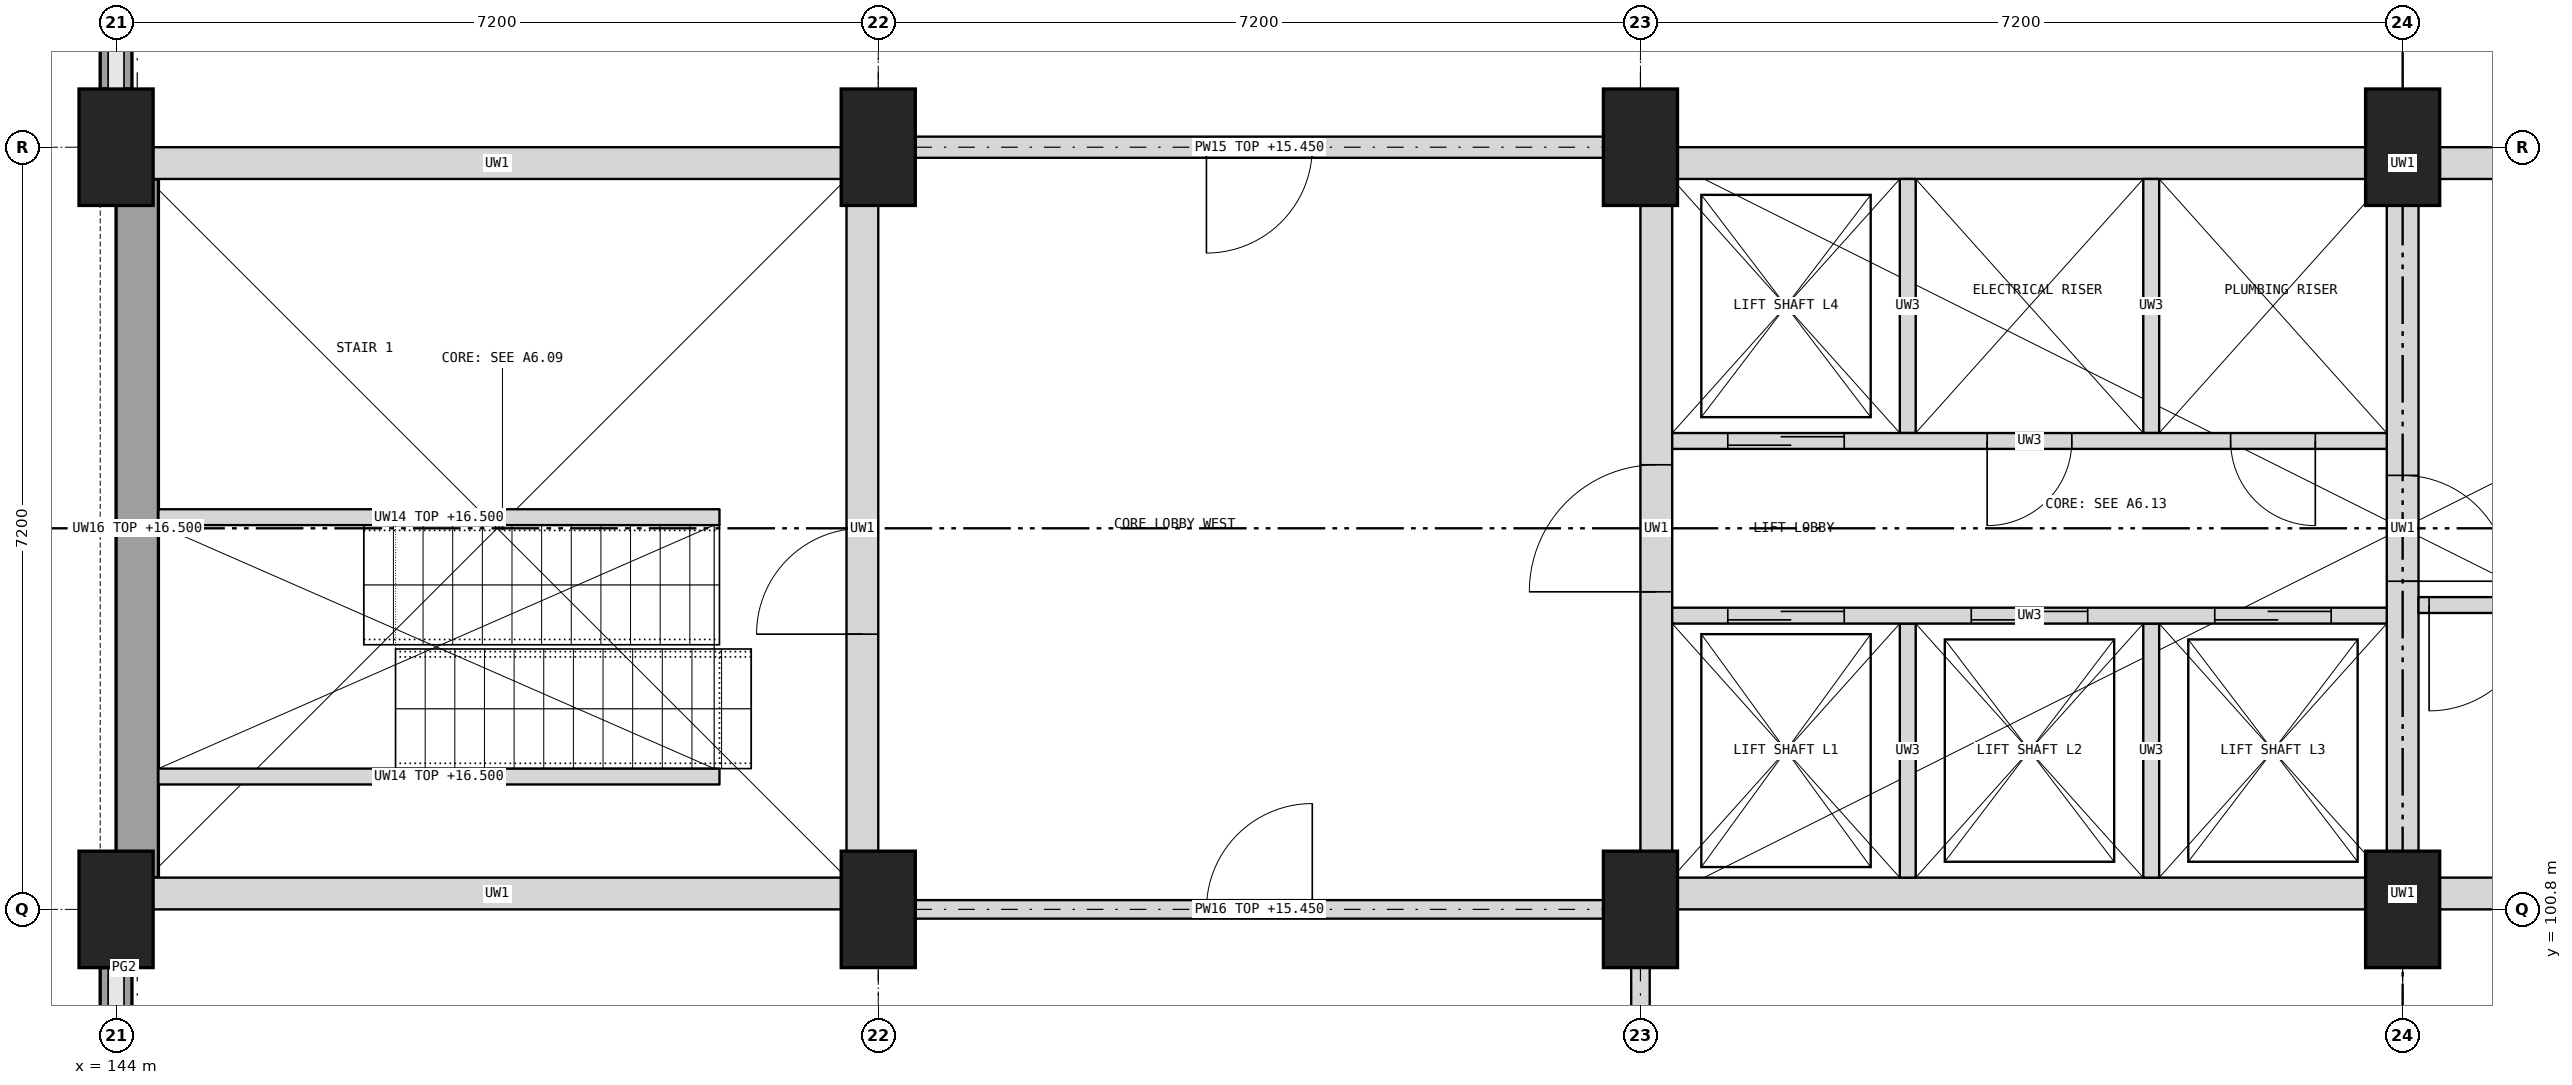
"""IFC4 building model, lengths in metres.
Left out: names, types, materials, properties, quantities, classifications, styles, units other than length and angle.
Written with IfcOpenShell. Run it as: python <this file> out.ifc"""

import sys

from ifc_helpers import new_model, si_unit, direction, frame, frame_2d, origin, origin_2d, place, context, subcontext, project, spatial, rectangle, extrude, element, fill, save


model = new_model("IFC4")
c1 = context("Model", 3, precision=1e-05, world=origin(), true_north=direction((0.0, 1.0)))
c2 = subcontext(c1, "Body", "Model", "MODEL_VIEW")
j1 = project(units=[si_unit("LENGTHUNIT", "METRE"), si_unit("PLANEANGLEUNIT", "RADIAN")], contexts=[c1])
p1 = place(None, origin())
s1 = spatial("IfcSite", under=j1, at=p1, CompositionType="ELEMENT")
p2 = place(p1, origin())
s2 = spatial("IfcBuilding", under=s1, at=p2, CompositionType="ELEMENT")
p3 = place(p2, frame((0.0, 0.0, 12.0)))
s3 = spatial("IfcBuildingStorey", under=s2, at=p3, CompositionType="ELEMENT", Elevation=12.0)
for number, where, z_axis, x_axis in (
    (1, (144.0, 100.8, 0.0), (0.0, 0.0, 1.0), (1.0, 0.0, 0.0)),
    (2, (144.0, 108.0, 0.0), (0.0, 0.0, 1.0), (1.0, 0.0, 0.0)),
    (3, (151.2, 100.8, 0.0), (0.0, 0.0, 1.0), (1.0, 0.0, 0.0)),
    (4, (151.2, 108.0, 0.0), (0.0, 0.0, 1.0), (1.0, 0.0, 0.0)),
    (5, (158.4, 100.8, 0.0), (0.0, 0.0, 1.0), (1.0, 0.0, 0.0)),
    (6, (158.4, 108.0, 0.0), (0.0, 0.0, 1.0), (1.0, 0.0, 0.0)),
    (7, (165.6, 100.8, 0.0), (0.0, 0.0, 1.0), (1.0, 0.0, 0.0)),
    (8, (165.6, 108.0, 0.0), (0.0, 0.0, 1.0), (1.0, 0.0, 0.0)),
):
    element("IfcColumn", number, at=place(p3, frame(where, z_axis=z_axis, x_axis=x_axis)), inside=s3, PredefinedType="COLUMN", context=c2, shape_type="SweptSolid", body=[
        extrude(rectangle(XDim=0.7, YDim=1.1, at=origin_2d()), origin(), (0.0, 0.0, 1.0), 4.5),
    ])
for number, where, z_axis, x_axis in (
    (9, (158.4, 100.95, 0.0), (0.0, 0.0, 1.0), (1.0, 0.0, 0.0)),
    (10, (158.4, 107.85, 0.0), (0.0, 0.0, 1.0), (1.0, 0.0, 0.0)),
):
    element("IfcWall", number, at=place(p3, frame(where, z_axis=z_axis, x_axis=x_axis)), inside=s3, PredefinedType="SHEAR", context=c2, shape_type="SweptSolid", body=[
        extrude(rectangle(XDim=14.4, YDim=0.3, at=frame_2d((7.2, 0.0))), origin(), (0.0, 0.0, 1.0), 4.5),
    ])
p4 = place(p3, frame((158.55, 101.1, 0.0), z_axis=(0.0, 0.0, 1.0), x_axis=(0.0, 1.0, 0.0)))
e11 = element("IfcWall", 11, at=p4, inside=s3, PredefinedType="SHEAR", context=c2, shape_type="SweptSolid", body=[
    extrude(rectangle(XDim=6.6, YDim=0.3, at=frame_2d((3.3, 0.0))), origin(), (0.0, 0.0, 1.0), 4.5),
])
p5 = place(p4, frame((2.7, 0.0, 0.0)))
e12 = element("IfcOpeningElement", 12, at=p5, cuts=e11, PredefinedType="OPENING", context=c2, shape_type="SweptSolid", body=[
    extrude(rectangle(XDim=1.2, YDim=2.1, at=frame_2d((0.6, 1.05))), frame((0.0, 0.16, 0.0), z_axis=(0.0, -1.0, 0.0), x_axis=(1.0, 0.0, 0.0)), (0.0, 0.0, 1.0), 0.32),
])
p6 = place(p3, frame((165.6, 101.1, 0.0), z_axis=(0.0, 0.0, 1.0), x_axis=(0.0, 1.0, 0.0)))
e13 = element("IfcWall", 13, at=p6, inside=s3, PredefinedType="SHEAR", context=c2, shape_type="SweptSolid", body=[
    extrude(rectangle(XDim=6.6, YDim=0.3, at=frame_2d((3.3, 0.0))), origin(), (0.0, 0.0, 1.0), 4.5),
])
p7 = place(p6, frame((2.8, 0.0, 0.0)))
e14 = element("IfcOpeningElement", 14, at=p7, cuts=e13, PredefinedType="OPENING", context=c2, shape_type="SweptSolid", body=[
    extrude(rectangle(XDim=1.0, YDim=2.1, at=frame_2d((0.5, 1.05))), frame((0.0, 0.16, 0.0), z_axis=(0.0, -1.0, 0.0), x_axis=(1.0, 0.0, 0.0)), (0.0, 0.0, 1.0), 0.32),
])
for number, where, z_axis, x_axis in (
    (15, (160.925, 101.1, 0.0), (0.0, 0.0, 1.0), (0.0, 1.0, 0.0)),
    (16, (163.225, 101.1, 0.0), (0.0, 0.0, 1.0), (0.0, 1.0, 0.0)),
    (17, (160.925, 105.3, 0.0), (0.0, 0.0, 1.0), (0.0, 1.0, 0.0)),
    (18, (163.225, 105.3, 0.0), (0.0, 0.0, 1.0), (0.0, 1.0, 0.0)),
):
    element("IfcWall", number, at=place(p3, frame(where, z_axis=z_axis, x_axis=x_axis)), inside=s3, PredefinedType="PARTITIONING", context=c2, shape_type="SweptSolid", body=[
        extrude(rectangle(XDim=2.4, YDim=0.15, at=frame_2d((1.2, 0.0))), origin(), (0.0, 0.0, 1.0), 4.5),
    ])
p8 = place(p3, frame((158.7, 103.575, 0.0), z_axis=(0.0, 0.0, 1.0), x_axis=(1.0, 0.0, 0.0)))
e19 = element("IfcWall", 19, at=p8, inside=s3, PredefinedType="PARTITIONING", context=c2, shape_type="SweptSolid", body=[
    extrude(rectangle(XDim=6.75, YDim=0.15, at=frame_2d((3.375, 0.0))), origin(), (0.0, 0.0, 1.0), 4.5),
])
p9 = place(p8, frame((0.525, 0.0, 0.0)))
e20 = element("IfcOpeningElement", 20, at=p9, cuts=e19, PredefinedType="OPENING", context=c2, shape_type="SweptSolid", body=[
    extrude(rectangle(XDim=1.1, YDim=2.1, at=frame_2d((0.55, 1.05))), frame((0.0, 0.085, 0.0), z_axis=(0.0, -1.0, 0.0), x_axis=(1.0, 0.0, 0.0)), (0.0, 0.0, 1.0), 0.17),
])
p10 = place(p8, frame((2.825, 0.0, 0.0)))
e21 = element("IfcOpeningElement", 21, at=p10, cuts=e19, PredefinedType="OPENING", context=c2, shape_type="SweptSolid", body=[
    extrude(rectangle(XDim=1.1, YDim=2.1, at=frame_2d((0.55, 1.05))), frame((0.0, 0.085, 0.0), z_axis=(0.0, -1.0, 0.0), x_axis=(1.0, 0.0, 0.0)), (0.0, 0.0, 1.0), 0.17),
])
p11 = place(p8, frame((5.125, 0.0, 0.0)))
e22 = element("IfcOpeningElement", 22, at=p11, cuts=e19, PredefinedType="OPENING", context=c2, shape_type="SweptSolid", body=[
    extrude(rectangle(XDim=1.1, YDim=2.1, at=frame_2d((0.55, 1.05))), frame((0.0, 0.085, 0.0), z_axis=(0.0, -1.0, 0.0), x_axis=(1.0, 0.0, 0.0)), (0.0, 0.0, 1.0), 0.17),
])
p12 = place(p3, frame((158.7, 105.225, 0.0), z_axis=(0.0, 0.0, 1.0), x_axis=(1.0, 0.0, 0.0)))
e23 = element("IfcWall", 23, at=p12, inside=s3, PredefinedType="PARTITIONING", context=c2, shape_type="SweptSolid", body=[
    extrude(rectangle(XDim=6.75, YDim=0.15, at=frame_2d((3.375, 0.0))), origin(), (0.0, 0.0, 1.0), 4.5),
])
p13 = place(p12, frame((0.525, 0.0, 0.0)))
e24 = element("IfcOpeningElement", 24, at=p13, cuts=e23, PredefinedType="OPENING", context=c2, shape_type="SweptSolid", body=[
    extrude(rectangle(XDim=1.1, YDim=2.1, at=frame_2d((0.55, 1.05))), frame((0.0, 0.085, 0.0), z_axis=(0.0, -1.0, 0.0), x_axis=(1.0, 0.0, 0.0)), (0.0, 0.0, 1.0), 0.17),
])
p14 = place(p12, frame((2.975, 0.0, 0.0)))
e25 = element("IfcOpeningElement", 25, at=p14, cuts=e23, PredefinedType="OPENING", context=c2, shape_type="SweptSolid", body=[
    extrude(rectangle(XDim=0.8, YDim=2.1, at=frame_2d((0.4, 1.05))), frame((0.0, 0.085, 0.0), z_axis=(0.0, -1.0, 0.0), x_axis=(1.0, 0.0, 0.0)), (0.0, 0.0, 1.0), 0.17),
])
p15 = place(p12, frame((5.275, 0.0, 0.0)))
e26 = element("IfcOpeningElement", 26, at=p15, cuts=e23, PredefinedType="OPENING", context=c2, shape_type="SweptSolid", body=[
    extrude(rectangle(XDim=0.8, YDim=2.1, at=frame_2d((0.4, 1.05))), frame((0.0, 0.085, 0.0), z_axis=(0.0, -1.0, 0.0), x_axis=(1.0, 0.0, 0.0)), (0.0, 0.0, 1.0), 0.17),
])
p16 = place(p3, frame((165.75, 103.675, 0.0), z_axis=(0.0, 0.0, 1.0), x_axis=(1.0, 0.0, 0.0)))
e27 = element("IfcWall", 27, at=p16, inside=s3, PredefinedType="SHEAR", context=c2, shape_type="SweptSolid", body=[
    extrude(rectangle(XDim=6.75, YDim=0.15, at=frame_2d((3.375, 0.0))), origin(), (0.0, 0.0, 1.0), 4.5),
])
p17 = place(p16, frame((0.1, 0.0, 0.0)))
e28 = element("IfcOpeningElement", 28, at=p17, cuts=e27, PredefinedType="OPENING", context=c2, shape_type="SweptSolid", body=[
    extrude(rectangle(XDim=1.0, YDim=2.1, at=frame_2d((0.5, 1.05))), frame((0.0, 0.085, 0.0), z_axis=(0.0, -1.0, 0.0), x_axis=(1.0, 0.0, 0.0)), (0.0, 0.0, 1.0), 0.17),
])
for number, where, z_axis, x_axis in (
    (29, (144.0, 100.95, 0.0), (0.0, 0.0, 1.0), (1.0, 0.0, 0.0)),
    (30, (144.0, 107.85, 0.0), (0.0, 0.0, 1.0), (1.0, 0.0, 0.0)),
):
    element("IfcWall", number, at=place(p3, frame(where, z_axis=z_axis, x_axis=x_axis)), inside=s3, PredefinedType="SHEAR", context=c2, shape_type="SweptSolid", body=[
        extrude(rectangle(XDim=7.2, YDim=0.3, at=frame_2d((3.6, 0.0))), origin(), (0.0, 0.0, 1.0), 4.5),
    ])
p18 = place(p3, frame((151.05, 101.1, 0.0), z_axis=(0.0, 0.0, 1.0), x_axis=(0.0, 1.0, 0.0)))
e31 = element("IfcWall", 31, at=p18, inside=s3, PredefinedType="SHEAR", context=c2, shape_type="SweptSolid", body=[
    extrude(rectangle(XDim=6.6, YDim=0.3, at=frame_2d((3.3, 0.0))), origin(), (0.0, 0.0, 1.0), 4.5),
])
p19 = place(p18, frame((2.3, 0.0, 0.0)))
e32 = element("IfcOpeningElement", 32, at=p19, cuts=e31, PredefinedType="OPENING", context=c2, shape_type="SweptSolid", body=[
    extrude(rectangle(XDim=1.0, YDim=2.1, at=frame_2d((0.5, 1.05))), frame((0.0, 0.16, 0.0), z_axis=(0.0, -1.0, 0.0), x_axis=(1.0, 0.0, 0.0)), (0.0, 0.0, 1.0), 0.32),
])
p20 = place(p3, frame((144.2, 101.1, 0.0), z_axis=(0.0, 0.0, 1.0), x_axis=(0.0, 1.0, 0.0)))
e33 = element("IfcWall", 33, at=p20, inside=s3, PredefinedType="SHEAR", context=c2, shape_type="SweptSolid", body=[
    extrude(rectangle(XDim=6.6, YDim=0.4, at=frame_2d((3.3, 0.0))), origin(), (0.0, 0.0, 1.0), 4.5),
])
for number, where, z_axis, x_axis in (
    (34, (144.4, 102.055, 0.0), (0.0, 0.0, 1.0), (1.0, 0.0, 0.0)),
    (35, (144.4, 104.505, 0.0), (0.0, 0.0, 1.0), (1.0, 0.0, 0.0)),
):
    element("IfcWall", number, at=place(p3, frame(where, z_axis=z_axis, x_axis=x_axis)), inside=s3, PredefinedType="SHEAR", context=c2, shape_type="SweptSolid", body=[
        extrude(rectangle(XDim=5.3, YDim=0.15, at=frame_2d((2.65, 0.0))), origin(), (0.0, 0.0, 1.0), 4.5),
    ])
p21 = place(p3, frame((144.0, 94.15, 0.0), z_axis=(0.0, 0.0, 1.0), x_axis=(0.0, 1.0, 0.0)))
e36 = element("IfcWall", 36, at=p21, inside=s3, PredefinedType="SOLIDWALL", context=c2, shape_type="SweptSolid", body=[
    extrude(rectangle(XDim=6.1, YDim=0.3, at=frame_2d((3.05, 0.0))), origin(), (0.0, 0.0, 1.0), 0.9),
])
p22 = place(p3, frame((144.0, 108.55, 0.0), z_axis=(0.0, 0.0, 1.0), x_axis=(0.0, 1.0, 0.0)))
e37 = element("IfcWall", 37, at=p22, inside=s3, PredefinedType="SOLIDWALL", context=c2, shape_type="SweptSolid", body=[
    extrude(rectangle(XDim=6.1, YDim=0.3, at=frame_2d((3.05, 0.0))), origin(), (0.0, 0.0, 1.0), 0.9),
])
p23 = place(p3, frame((158.4, 96.087, 0.0), z_axis=(0.0, 0.0, 1.0), x_axis=(0.0, 1.0, 0.0)))
e38 = element("IfcWall", 38, at=p23, inside=s3, PredefinedType="PARTITIONING", context=c2, shape_type="SweptSolid", body=[
    extrude(rectangle(XDim=4.163, YDim=0.175, at=frame_2d((2.081, 0.0))), origin(), (0.0, 0.0, 1.0), 3.45),
])
p24 = place(p3, frame((151.55, 108.0, 0.0), z_axis=(0.0, 0.0, 1.0), x_axis=(1.0, 0.0, 0.0)))
e39 = element("IfcWall", 39, at=p24, inside=s3, PredefinedType="PARTITIONING", context=c2, shape_type="SweptSolid", body=[
    extrude(rectangle(XDim=6.5, YDim=0.2, at=frame_2d((3.25, 0.0))), origin(), (0.0, 0.0, 1.0), 3.45),
])
p25 = place(p24, frame((2.75, 0.0, 0.0)))
e40 = element("IfcOpeningElement", 40, at=p25, cuts=e39, PredefinedType="OPENING", context=c2, shape_type="SweptSolid", body=[
    extrude(rectangle(XDim=1.0, YDim=2.1, at=frame_2d((0.5, 1.05))), frame((0.0, 0.11, 0.0), z_axis=(0.0, -1.0, 0.0), x_axis=(1.0, 0.0, 0.0)), (0.0, 0.0, 1.0), 0.22),
])
p26 = place(p3, frame((151.55, 100.8, 0.0), z_axis=(0.0, 0.0, 1.0), x_axis=(1.0, 0.0, 0.0)))
e41 = element("IfcWall", 41, at=p26, inside=s3, PredefinedType="PARTITIONING", context=c2, shape_type="SweptSolid", body=[
    extrude(rectangle(XDim=6.5, YDim=0.175, at=frame_2d((3.25, 0.0))), origin(), (0.0, 0.0, 1.0), 3.45),
])
p27 = place(p26, frame((2.75, 0.0, 0.0)))
e42 = element("IfcOpeningElement", 42, at=p27, cuts=e41, PredefinedType="OPENING", context=c2, shape_type="SweptSolid", body=[
    extrude(rectangle(XDim=1.0, YDim=2.1, at=frame_2d((0.5, 1.05))), frame((0.0, 0.097, 0.0), z_axis=(0.0, -1.0, 0.0), x_axis=(1.0, 0.0, 0.0)), (0.0, 0.0, 1.0), 0.195),
])
p28 = place(p27, origin())
e43 = element("IfcDoor", 43, at=p28, inside=s3, OperationType="SINGLE_SWING_RIGHT", PredefinedType="DOOR", context=c2, shape_type="SweptSolid", body=[
    extrude(rectangle(XDim=1.0, YDim=2.1, at=frame_2d((0.5, 1.05))), frame((0.0, 0.025, 0.0), z_axis=(0.0, -1.0, 0.0), x_axis=(1.0, 0.0, 0.0)), (0.0, 0.0, 1.0), 0.05),
])
fill(e42, e43)
p29 = place(p25, frame((1.0, 0.0, 0.0), z_axis=(0.0, 0.0, 1.0), x_axis=(-1.0, 0.0, 0.0)))
e44 = element("IfcDoor", 44, at=p29, inside=s3, OperationType="SINGLE_SWING_RIGHT", PredefinedType="DOOR", context=c2, shape_type="SweptSolid", body=[
    extrude(rectangle(XDim=1.0, YDim=2.1, at=frame_2d((0.5, 1.05))), frame((0.0, 0.025, 0.0), z_axis=(0.0, -1.0, 0.0), x_axis=(1.0, 0.0, 0.0)), (0.0, 0.0, 1.0), 0.05),
])
fill(e40, e44)
p30 = place(p9, origin())
e45 = element("IfcDoor", 45, at=p30, inside=s3, OperationType="DOUBLE_DOOR_SLIDING", PredefinedType="DOOR", context=c2, shape_type="SweptSolid", body=[
    extrude(rectangle(XDim=1.1, YDim=2.1, at=frame_2d((0.55, 1.05))), frame((0.0, 0.025, 0.0), z_axis=(0.0, -1.0, 0.0), x_axis=(1.0, 0.0, 0.0)), (0.0, 0.0, 1.0), 0.05),
])
fill(e20, e45)
p31 = place(p10, origin())
e46 = element("IfcDoor", 46, at=p31, inside=s3, OperationType="DOUBLE_DOOR_SLIDING", PredefinedType="DOOR", context=c2, shape_type="SweptSolid", body=[
    extrude(rectangle(XDim=1.1, YDim=2.1, at=frame_2d((0.55, 1.05))), frame((0.0, 0.025, 0.0), z_axis=(0.0, -1.0, 0.0), x_axis=(1.0, 0.0, 0.0)), (0.0, 0.0, 1.0), 0.05),
])
fill(e21, e46)
p32 = place(p11, origin())
e47 = element("IfcDoor", 47, at=p32, inside=s3, OperationType="DOUBLE_DOOR_SLIDING", PredefinedType="DOOR", context=c2, shape_type="SweptSolid", body=[
    extrude(rectangle(XDim=1.1, YDim=2.1, at=frame_2d((0.55, 1.05))), frame((0.0, 0.025, 0.0), z_axis=(0.0, -1.0, 0.0), x_axis=(1.0, 0.0, 0.0)), (0.0, 0.0, 1.0), 0.05),
])
fill(e22, e47)
p33 = place(p13, origin())
e48 = element("IfcDoor", 48, at=p33, inside=s3, OperationType="DOUBLE_DOOR_SLIDING", PredefinedType="DOOR", context=c2, shape_type="SweptSolid", body=[
    extrude(rectangle(XDim=1.1, YDim=2.1, at=frame_2d((0.55, 1.05))), frame((0.0, 0.025, 0.0), z_axis=(0.0, -1.0, 0.0), x_axis=(1.0, 0.0, 0.0)), (0.0, 0.0, 1.0), 0.05),
])
fill(e24, e48)
p34 = place(p14, frame((0.8, 0.0, 0.0), z_axis=(0.0, 0.0, 1.0), x_axis=(-1.0, 0.0, 0.0)))
e49 = element("IfcDoor", 49, at=p34, inside=s3, OperationType="SINGLE_SWING_RIGHT", PredefinedType="DOOR", context=c2, shape_type="SweptSolid", body=[
    extrude(rectangle(XDim=0.8, YDim=2.1, at=frame_2d((0.4, 1.05))), frame((0.0, 0.025, 0.0), z_axis=(0.0, -1.0, 0.0), x_axis=(1.0, 0.0, 0.0)), (0.0, 0.0, 1.0), 0.05),
])
fill(e25, e49)
p35 = place(p15, frame((0.8, 0.0, 0.0), z_axis=(0.0, 0.0, 1.0), x_axis=(-1.0, 0.0, 0.0)))
e50 = element("IfcDoor", 50, at=p35, inside=s3, OperationType="SINGLE_SWING_LEFT", PredefinedType="DOOR", context=c2, shape_type="SweptSolid", body=[
    extrude(rectangle(XDim=0.8, YDim=2.1, at=frame_2d((0.4, 1.05))), frame((0.0, 0.025, 0.0), z_axis=(0.0, -1.0, 0.0), x_axis=(1.0, 0.0, 0.0)), (0.0, 0.0, 1.0), 0.05),
])
fill(e26, e50)
p36 = place(p5, origin())
e51 = element("IfcDoor", 51, at=p36, inside=s3, OperationType="SINGLE_SWING_LEFT", PredefinedType="DOOR", context=c2, shape_type="SweptSolid", body=[
    extrude(rectangle(XDim=1.2, YDim=2.1, at=frame_2d((0.6, 1.05))), frame((0.0, 0.025, 0.0), z_axis=(0.0, -1.0, 0.0), x_axis=(1.0, 0.0, 0.0)), (0.0, 0.0, 1.0), 0.05),
])
fill(e12, e51)
p37 = place(p7, frame((1.0, 0.0, 0.0), z_axis=(0.0, 0.0, 1.0), x_axis=(-1.0, 0.0, 0.0)))
e52 = element("IfcDoor", 52, at=p37, inside=s3, OperationType="SINGLE_SWING_RIGHT", PredefinedType="DOOR", context=c2, shape_type="SweptSolid", body=[
    extrude(rectangle(XDim=1.0, YDim=2.1, at=frame_2d((0.5, 1.05))), frame((0.0, 0.025, 0.0), z_axis=(0.0, -1.0, 0.0), x_axis=(1.0, 0.0, 0.0)), (0.0, 0.0, 1.0), 0.05),
])
fill(e14, e52)
p38 = place(p17, frame((1.0, 0.0, 0.0), z_axis=(0.0, 0.0, 1.0), x_axis=(-1.0, 0.0, 0.0)))
e53 = element("IfcDoor", 53, at=p38, inside=s3, OperationType="SINGLE_SWING_RIGHT", PredefinedType="DOOR", context=c2, shape_type="SweptSolid", body=[
    extrude(rectangle(XDim=1.0, YDim=2.1, at=frame_2d((0.5, 1.05))), frame((0.0, 0.025, 0.0), z_axis=(0.0, -1.0, 0.0), x_axis=(1.0, 0.0, 0.0)), (0.0, 0.0, 1.0), 0.05),
])
fill(e28, e53)
p39 = place(p19, origin())
e54 = element("IfcDoor", 54, at=p39, inside=s3, OperationType="SINGLE_SWING_LEFT", PredefinedType="DOOR", context=c2, shape_type="SweptSolid", body=[
    extrude(rectangle(XDim=1.0, YDim=2.1, at=frame_2d((0.5, 1.05))), frame((0.0, 0.025, 0.0), z_axis=(0.0, -1.0, 0.0), x_axis=(1.0, 0.0, 0.0)), (0.0, 0.0, 1.0), 0.05),
])
fill(e32, e54)
save(model, sys.argv[1])
